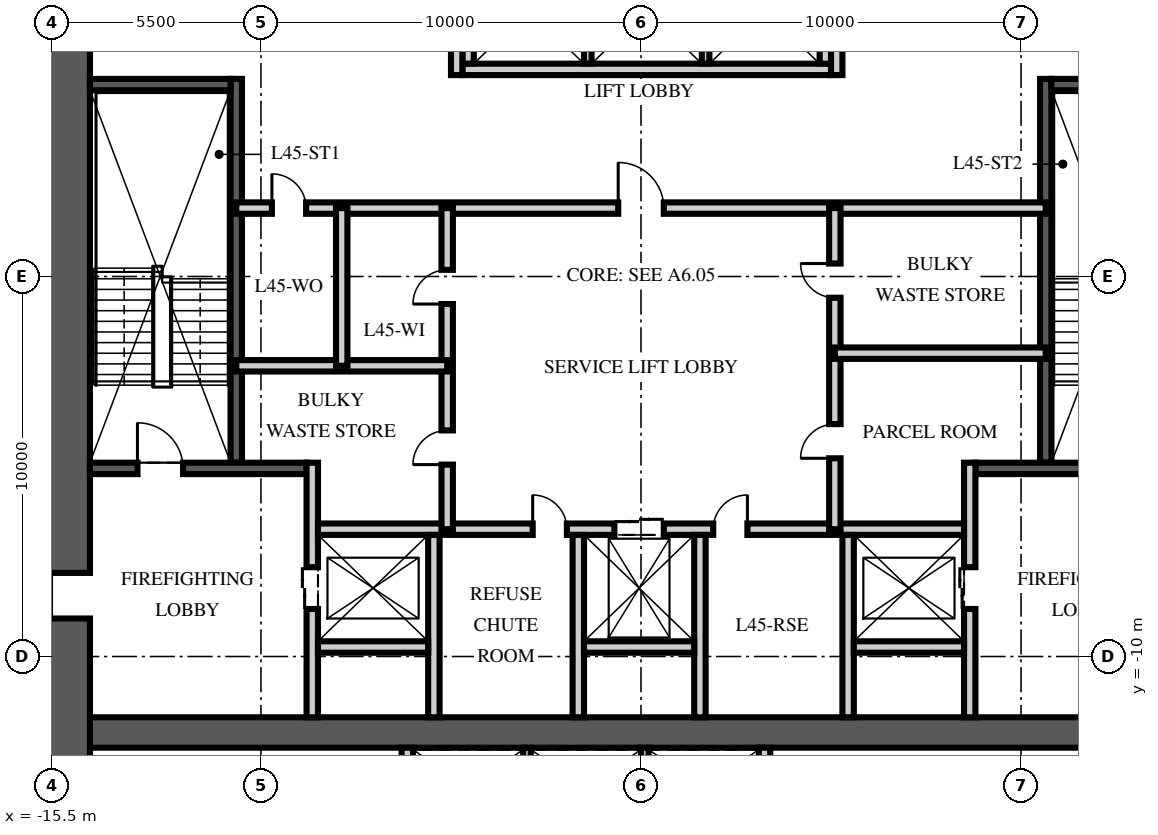
"""IFC4 building model, lengths in metres.
Left out: names, types, materials, properties, quantities, classifications, styles, units other than length and angle.
Written with IfcOpenShell. Run it as: python <this file> out.ifc"""

import sys

from ifc_helpers import new_model, si_unit, direction, frame, frame_2d, origin, place, context, subcontext, project, spatial, rectangle, extrude, element, fill, save


model = new_model("IFC4")
c1 = context("Model", 3, precision=1e-05, world=origin(), true_north=direction((0.0, 1.0)))
c2 = subcontext(c1, "Body", "Model", "MODEL_VIEW")
j1 = project(units=[si_unit("LENGTHUNIT", "METRE"), si_unit("PLANEANGLEUNIT", "RADIAN")], contexts=[c1])
p1 = place(None, origin())
s1 = spatial("IfcSite", under=j1, at=p1, CompositionType="ELEMENT")
p2 = place(p1, origin())
s2 = spatial("IfcBuilding", under=s1, at=p2, CompositionType="ELEMENT")
p3 = place(p2, frame((0.0, 0.0, 178.5)))
s3 = spatial("IfcBuildingStorey", under=s2, at=p3, CompositionType="ELEMENT", Elevation=178.5)
p4 = place(p3, frame((-15.5, -12.0, -0.25), z_axis=(0.0, 0.0, 1.0), x_axis=(1.0, 0.0, 0.0)))
e1 = element("IfcWall", 1, at=p4, inside=s3, PredefinedType="SHEAR", context=c2, shape_type="SweptSolid", body=[
    extrude(rectangle(XDim=31.0, YDim=0.8, at=frame_2d((15.5, 0.0))), origin(), (0.0, 0.0, 1.0), 3.75),
])
p5 = place(p3, frame((-15.5, -15.5, -0.25), z_axis=(0.0, 0.0, 1.0), x_axis=(0.0, 1.0, 0.0)))
e2 = element("IfcWall", 2, at=p5, inside=s3, PredefinedType="SHEAR", context=c2, shape_type="SweptSolid", body=[
    extrude(rectangle(XDim=31.0, YDim=2.0, at=frame_2d((15.5, 0.0))), origin(), (0.0, 0.0, 1.0), 3.75),
])
p6 = place(p5, frame((6.5, 0.0, 0.25)))
e3 = element("IfcOpeningElement", 3, at=p6, cuts=e2, PredefinedType="OPENING", context=c2, shape_type="SweptSolid", body=[
    extrude(rectangle(XDim=1.2, YDim=2.1, at=frame_2d((0.6, 1.05))), frame((0.0, 1.01, 0.0), z_axis=(0.0, -1.0, 0.0), x_axis=(1.0, 0.0, 0.0)), (0.0, 0.0, 1.0), 2.02),
])
p7 = place(p5, frame((23.0, 0.0, 0.25)))
e4 = element("IfcOpeningElement", 4, at=p7, cuts=e2, PredefinedType="OPENING", context=c2, shape_type="SweptSolid", body=[
    extrude(rectangle(XDim=1.8, YDim=2.1, at=frame_2d((0.9, 1.05))), frame((0.0, 1.01, 0.0), z_axis=(0.0, -1.0, 0.0), x_axis=(1.0, 0.0, 0.0)), (0.0, 0.0, 1.0), 2.02),
])
p8 = place(p3, frame((-10.65, -4.9, 0.0), z_axis=(0.0, 0.0, 1.0), x_axis=(0.0, 1.0, 0.0)))
e5 = element("IfcWall", 5, at=p8, inside=s3, PredefinedType="SOLIDWALL", context=c2, shape_type="SweptSolid", body=[
    extrude(rectangle(XDim=10.1, YDim=0.3, at=frame_2d((5.05, 0.0))), origin(), (0.0, 0.0, 1.0), 3.5),
])
p9 = place(p3, frame((-14.5, -5.05, 0.0), z_axis=(0.0, 0.0, 1.0), x_axis=(1.0, 0.0, 0.0)))
e6 = element("IfcWall", 6, at=p9, inside=s3, PredefinedType="SOLIDWALL", context=c2, shape_type="SweptSolid", body=[
    extrude(rectangle(XDim=5.7, YDim=0.3, at=frame_2d((2.85, 0.0))), origin(), (0.0, 0.0, 1.0), 3.5),
])
p10 = place(p9, frame((1.25, 0.0, 0.0)))
e7 = element("IfcOpeningElement", 7, at=p10, cuts=e6, PredefinedType="OPENING", context=c2, shape_type="SweptSolid", body=[
    extrude(rectangle(XDim=1.2, YDim=2.1, at=frame_2d((0.6, 1.05))), frame((0.0, 0.16, 0.0), z_axis=(0.0, -1.0, 0.0), x_axis=(1.0, 0.0, 0.0)), (0.0, 0.0, 1.0), 0.32),
])
p11 = place(p3, frame((-14.5, 5.05, 0.0), z_axis=(0.0, 0.0, 1.0), x_axis=(1.0, 0.0, 0.0)))
e8 = element("IfcWall", 8, at=p11, inside=s3, PredefinedType="SOLIDWALL", context=c2, shape_type="SweptSolid", body=[
    extrude(rectangle(XDim=3.7, YDim=0.3, at=frame_2d((1.85, 0.0))), origin(), (0.0, 0.0, 1.0), 3.5),
])
p12 = place(p3, frame((-8.65, -11.6, 0.0), z_axis=(0.0, 0.0, 1.0), x_axis=(0.0, 1.0, 0.0)))
e9 = element("IfcWall", 9, at=p12, inside=s3, PredefinedType="PARTITIONING", context=c2, shape_type="SweptSolid", body=[
    extrude(rectangle(XDim=6.7, YDim=0.3, at=frame_2d((3.35, 0.0))), origin(), (0.0, 0.0, 1.0), 3.5),
])
p13 = place(p12, frame((2.85, 0.0, 0.0)))
e10 = element("IfcOpeningElement", 10, at=p13, cuts=e9, PredefinedType="OPENING", context=c2, shape_type="SweptSolid", body=[
    extrude(rectangle(XDim=1.1, YDim=2.1, at=frame_2d((0.55, 1.05))), frame((0.0, 0.16, 0.0), z_axis=(0.0, -1.0, 0.0), x_axis=(1.0, 0.0, 0.0)), (0.0, 0.0, 1.0), 0.32),
])
p14 = place(p3, frame((10.65, -4.9, 0.0), z_axis=(0.0, 0.0, 1.0), x_axis=(0.0, 1.0, 0.0)))
e11 = element("IfcWall", 11, at=p14, inside=s3, PredefinedType="SOLIDWALL", context=c2, shape_type="SweptSolid", body=[
    extrude(rectangle(XDim=10.1, YDim=0.3, at=frame_2d((5.05, 0.0))), origin(), (0.0, 0.0, 1.0), 3.5),
])
p15 = place(p3, frame((14.5, -5.05, 0.0), z_axis=(0.0, 0.0, 1.0), x_axis=(-1.0, 0.0, 0.0)))
e12 = element("IfcWall", 12, at=p15, inside=s3, PredefinedType="SOLIDWALL", context=c2, shape_type="SweptSolid", body=[
    extrude(rectangle(XDim=5.7, YDim=0.3, at=frame_2d((2.85, 0.0))), origin(), (0.0, 0.0, 1.0), 3.5),
])
p16 = place(p15, frame((1.25, 0.0, 0.0)))
e13 = element("IfcOpeningElement", 13, at=p16, cuts=e12, PredefinedType="OPENING", context=c2, shape_type="SweptSolid", body=[
    extrude(rectangle(XDim=1.2, YDim=2.1, at=frame_2d((0.6, 1.05))), frame((0.0, 0.16, 0.0), z_axis=(0.0, -1.0, 0.0), x_axis=(1.0, 0.0, 0.0)), (0.0, 0.0, 1.0), 0.32),
])
p17 = place(p3, frame((14.5, 5.05, 0.0), z_axis=(0.0, 0.0, 1.0), x_axis=(-1.0, 0.0, 0.0)))
e14 = element("IfcWall", 14, at=p17, inside=s3, PredefinedType="SOLIDWALL", context=c2, shape_type="SweptSolid", body=[
    extrude(rectangle(XDim=3.7, YDim=0.3, at=frame_2d((1.85, 0.0))), origin(), (0.0, 0.0, 1.0), 3.5),
])
p18 = place(p3, frame((8.65, -11.6, 0.0), z_axis=(0.0, 0.0, 1.0), x_axis=(0.0, 1.0, 0.0)))
e15 = element("IfcWall", 15, at=p18, inside=s3, PredefinedType="PARTITIONING", context=c2, shape_type="SweptSolid", body=[
    extrude(rectangle(XDim=6.7, YDim=0.3, at=frame_2d((3.35, 0.0))), origin(), (0.0, 0.0, 1.0), 3.5),
])
p19 = place(p18, frame((2.85, 0.0, 0.0)))
e16 = element("IfcOpeningElement", 16, at=p19, cuts=e15, PredefinedType="OPENING", context=c2, shape_type="SweptSolid", body=[
    extrude(rectangle(XDim=1.1, YDim=2.1, at=frame_2d((0.55, 1.05))), frame((0.0, 0.16, 0.0), z_axis=(0.0, -1.0, 0.0), x_axis=(1.0, 0.0, 0.0)), (0.0, 0.0, 1.0), 0.32),
])
p20 = place(p3, frame((-8.5, -6.65, 0.0), z_axis=(0.0, 0.0, 1.0), x_axis=(1.0, 0.0, 0.0)))
e17 = element("IfcWall", 17, at=p20, inside=s3, PredefinedType="PARTITIONING", context=c2, shape_type="SweptSolid", body=[
    extrude(rectangle(XDim=17.0, YDim=0.3, at=frame_2d((8.5, 0.0))), origin(), (0.0, 0.0, 1.0), 3.5),
])
p21 = place(p20, frame((7.8, 0.0, 0.0)))
e18 = element("IfcOpeningElement", 18, at=p21, cuts=e17, PredefinedType="OPENING", context=c2, shape_type="SweptSolid", body=[
    extrude(rectangle(XDim=1.3, YDim=2.4, at=frame_2d((0.65, 1.2))), frame((0.0, 0.16, 0.0), z_axis=(0.0, -1.0, 0.0), x_axis=(1.0, 0.0, 0.0)), (0.0, 0.0, 1.0), 0.32),
])
p22 = place(p20, frame((5.65, 0.0, 0.0)))
e19 = element("IfcOpeningElement", 19, at=p22, cuts=e17, PredefinedType="OPENING", context=c2, shape_type="SweptSolid", body=[
    extrude(rectangle(XDim=0.9, YDim=2.1, at=frame_2d((0.45, 1.05))), frame((0.0, 0.16, 0.0), z_axis=(0.0, -1.0, 0.0), x_axis=(1.0, 0.0, 0.0)), (0.0, 0.0, 1.0), 0.32),
])
p23 = place(p20, frame((10.4, 0.0, 0.0)))
e20 = element("IfcOpeningElement", 20, at=p23, cuts=e17, PredefinedType="OPENING", context=c2, shape_type="SweptSolid", body=[
    extrude(rectangle(XDim=0.9, YDim=2.1, at=frame_2d((0.45, 1.05))), frame((0.0, 0.16, 0.0), z_axis=(0.0, -1.0, 0.0), x_axis=(1.0, 0.0, 0.0)), (0.0, 0.0, 1.0), 0.32),
])
for number, where, z_axis, x_axis in (
    (21, (-5.45, -11.6, 0.0), (0.0, 0.0, 1.0), (0.0, 1.0, 0.0)),
    (22, (-1.65, -11.6, 0.0), (0.0, 0.0, 1.0), (0.0, 1.0, 0.0)),
    (23, (1.55, -11.6, 0.0), (0.0, 0.0, 1.0), (0.0, 1.0, 0.0)),
    (24, (5.45, -11.6, 0.0), (0.0, 0.0, 1.0), (0.0, 1.0, 0.0)),
):
    element("IfcWall", number, at=place(p3, frame(where, z_axis=z_axis, x_axis=x_axis)), inside=s3, PredefinedType="PARTITIONING", context=c2, shape_type="SweptSolid", body=[
        extrude(rectangle(XDim=4.8, YDim=0.3, at=frame_2d((2.4, 0.0))), origin(), (0.0, 0.0, 1.0), 3.5),
    ])
for number, where, z_axis, x_axis in (
    (25, (-8.5, -9.75, 0.0), (0.0, 0.0, 1.0), (1.0, 0.0, 0.0)),
    (26, (-1.5, -9.75, 0.0), (0.0, 0.0, 1.0), (1.0, 0.0, 0.0)),
    (27, (5.6, -9.75, 0.0), (0.0, 0.0, 1.0), (1.0, 0.0, 0.0)),
):
    element("IfcWall", number, at=place(p3, frame(where, z_axis=z_axis, x_axis=x_axis)), inside=s3, PredefinedType="PARTITIONING", context=c2, shape_type="SweptSolid", body=[
        extrude(rectangle(XDim=2.9, YDim=0.3, at=frame_2d((1.45, 0.0))), origin(), (0.0, 0.0, 1.0), 3.5),
    ])
p24 = place(p3, frame((-4.7, 5.45, 0.0), z_axis=(0.0, 0.0, 1.0), x_axis=(1.0, 0.0, 0.0)))
e28 = element("IfcWall", 28, at=p24, inside=s3, PredefinedType="PARTITIONING", context=c2, shape_type="SweptSolid", body=[
    extrude(rectangle(XDim=9.7, YDim=0.3, at=frame_2d((4.85, 0.0))), origin(), (0.0, 0.0, 1.0), 3.5),
])
for number, where, z_axis, x_axis in (
    (29, (-4.55, 5.6, 0.0), (0.0, 0.0, 1.0), (0.0, 1.0, 0.0)),
    (30, (4.85, 5.6, 0.0), (0.0, 0.0, 1.0), (0.0, 1.0, 0.0)),
):
    element("IfcWall", number, at=place(p3, frame(where, z_axis=z_axis, x_axis=x_axis)), inside=s3, PredefinedType="PARTITIONING", context=c2, shape_type="SweptSolid", body=[
        extrude(rectangle(XDim=2.8, YDim=0.3, at=frame_2d((1.4, 0.0))), origin(), (0.0, 0.0, 1.0), 3.5),
    ])
for number, where, z_axis, x_axis in (
    (31, (-1.4, 5.6, 0.0), (0.0, 0.0, 1.0), (0.0, 1.0, 0.0)),
    (32, (1.7, 5.6, 0.0), (0.0, 0.0, 1.0), (0.0, 1.0, 0.0)),
):
    element("IfcWall", number, at=place(p3, frame(where, z_axis=z_axis, x_axis=x_axis)), inside=s3, PredefinedType="PARTITIONING", context=c2, shape_type="SweptSolid", body=[
        extrude(rectangle(XDim=2.8, YDim=0.2, at=frame_2d((1.4, 0.0))), origin(), (0.0, 0.0, 1.0), 3.5),
    ])
for number, where, z_axis, x_axis in (
    (33, (-6.15, -14.5, 0.0), (0.0, 0.0, 1.0), (0.0, 1.0, 0.0)),
    (34, (3.25, -14.5, 0.0), (0.0, 0.0, 1.0), (0.0, 1.0, 0.0)),
):
    element("IfcWall", number, at=place(p3, frame(where, z_axis=z_axis, x_axis=x_axis)), inside=s3, PredefinedType="PARTITIONING", context=c2, shape_type="SweptSolid", body=[
        extrude(rectangle(XDim=2.1, YDim=0.3, at=frame_2d((1.05, 0.0))), origin(), (0.0, 0.0, 1.0), 3.5),
    ])
for number, where, z_axis, x_axis in (
    (35, (-3.0, -14.5, 0.0), (0.0, 0.0, 1.0), (0.0, 1.0, 0.0)),
    (36, (0.1, -14.5, 0.0), (0.0, 0.0, 1.0), (0.0, 1.0, 0.0)),
):
    element("IfcWall", number, at=place(p3, frame(where, z_axis=z_axis, x_axis=x_axis)), inside=s3, PredefinedType="PARTITIONING", context=c2, shape_type="SweptSolid", body=[
        extrude(rectangle(XDim=2.1, YDim=0.2, at=frame_2d((1.05, 0.0))), origin(), (0.0, 0.0, 1.0), 3.5),
    ])
p25 = place(p3, frame((-10.65, 1.8, 0.0), z_axis=(0.0, 0.0, 1.0), x_axis=(1.0, 0.0, 0.0)))
e37 = element("IfcWall", 37, at=p25, inside=s3, PredefinedType="PARTITIONING", context=c2, shape_type="SweptSolid", body=[
    extrude(rectangle(XDim=21.3, YDim=0.3, at=frame_2d((10.65, 0.0))), origin(), (0.0, 0.0, 1.0), 3.5),
])
p26 = place(p25, frame((10.05, 0.0, 0.0)))
e38 = element("IfcOpeningElement", 38, at=p26, cuts=e37, PredefinedType="OPENING", context=c2, shape_type="SweptSolid", body=[
    extrude(rectangle(XDim=1.2, YDim=2.1, at=frame_2d((0.6, 1.05))), frame((0.0, 0.16, 0.0), z_axis=(0.0, -1.0, 0.0), x_axis=(1.0, 0.0, 0.0)), (0.0, 0.0, 1.0), 0.32),
])
p27 = place(p25, frame((0.938, 0.0, 0.0)))
e39 = element("IfcOpeningElement", 39, at=p27, cuts=e37, PredefinedType="OPENING", context=c2, shape_type="SweptSolid", body=[
    extrude(rectangle(XDim=0.9, YDim=2.1, at=frame_2d((0.45, 1.05))), frame((0.0, 0.16, 0.0), z_axis=(0.0, -1.0, 0.0), x_axis=(1.0, 0.0, 0.0)), (0.0, 0.0, 1.0), 0.32),
])
p28 = place(p3, frame((-5.1, -6.65, 0.0), z_axis=(0.0, 0.0, 1.0), x_axis=(0.0, 1.0, 0.0)))
e40 = element("IfcWall", 40, at=p28, inside=s3, PredefinedType="PARTITIONING", context=c2, shape_type="SweptSolid", body=[
    extrude(rectangle(XDim=8.45, YDim=0.3, at=frame_2d((4.225, 0.0))), origin(), (0.0, 0.0, 1.0), 3.5),
])
p29 = place(p28, frame((1.7, 0.0, 0.0)))
e41 = element("IfcOpeningElement", 41, at=p29, cuts=e40, PredefinedType="OPENING", context=c2, shape_type="SweptSolid", body=[
    extrude(rectangle(XDim=0.9, YDim=2.1, at=frame_2d((0.45, 1.05))), frame((0.0, 0.16, 0.0), z_axis=(0.0, -1.0, 0.0), x_axis=(1.0, 0.0, 0.0)), (0.0, 0.0, 1.0), 0.32),
])
p30 = place(p28, frame((5.925, 0.0, 0.0)))
e42 = element("IfcOpeningElement", 42, at=p30, cuts=e40, PredefinedType="OPENING", context=c2, shape_type="SweptSolid", body=[
    extrude(rectangle(XDim=0.9, YDim=2.1, at=frame_2d((0.45, 1.05))), frame((0.0, 0.16, 0.0), z_axis=(0.0, -1.0, 0.0), x_axis=(1.0, 0.0, 0.0)), (0.0, 0.0, 1.0), 0.32),
])
p31 = place(p3, frame((5.1, -6.65, 0.0), z_axis=(0.0, 0.0, 1.0), x_axis=(0.0, 1.0, 0.0)))
e43 = element("IfcWall", 43, at=p31, inside=s3, PredefinedType="PARTITIONING", context=c2, shape_type="SweptSolid", body=[
    extrude(rectangle(XDim=8.45, YDim=0.3, at=frame_2d((4.225, 0.0))), origin(), (0.0, 0.0, 1.0), 3.5),
])
p32 = place(p31, frame((1.866, 0.0, 0.0)))
e44 = element("IfcOpeningElement", 44, at=p32, cuts=e43, PredefinedType="OPENING", context=c2, shape_type="SweptSolid", body=[
    extrude(rectangle(XDim=0.9, YDim=2.1, at=frame_2d((0.45, 1.05))), frame((0.0, 0.16, 0.0), z_axis=(0.0, -1.0, 0.0), x_axis=(1.0, 0.0, 0.0)), (0.0, 0.0, 1.0), 0.32),
])
p33 = place(p31, frame((6.091, 0.0, 0.0)))
e45 = element("IfcOpeningElement", 45, at=p33, cuts=e43, PredefinedType="OPENING", context=c2, shape_type="SweptSolid", body=[
    extrude(rectangle(XDim=0.9, YDim=2.1, at=frame_2d((0.45, 1.05))), frame((0.0, 0.16, 0.0), z_axis=(0.0, -1.0, 0.0), x_axis=(1.0, 0.0, 0.0)), (0.0, 0.0, 1.0), 0.32),
])
p34 = place(p3, frame((-10.65, -2.35, 0.0), z_axis=(0.0, 0.0, 1.0), x_axis=(1.0, 0.0, 0.0)))
e46 = element("IfcWall", 46, at=p34, inside=s3, PredefinedType="PARTITIONING", context=c2, shape_type="SweptSolid", body=[
    extrude(rectangle(XDim=5.55, YDim=0.3, at=frame_2d((2.775, 0.0))), origin(), (0.0, 0.0, 1.0), 3.5),
])
p35 = place(p3, frame((-7.875, -2.35, 0.0), z_axis=(0.0, 0.0, 1.0), x_axis=(0.0, 1.0, 0.0)))
e47 = element("IfcWall", 47, at=p35, inside=s3, PredefinedType="PARTITIONING", context=c2, shape_type="SweptSolid", body=[
    extrude(rectangle(XDim=4.15, YDim=0.3, at=frame_2d((2.075, 0.0))), origin(), (0.0, 0.0, 1.0), 3.5),
])
p36 = place(p3, frame((10.65, -2.018, 0.0), z_axis=(0.0, 0.0, 1.0), x_axis=(-1.0, 0.0, 0.0)))
e48 = element("IfcWall", 48, at=p36, inside=s3, PredefinedType="PARTITIONING", context=c2, shape_type="SweptSolid", body=[
    extrude(rectangle(XDim=5.55, YDim=0.3, at=frame_2d((2.775, 0.0))), origin(), (0.0, 0.0, 1.0), 3.5),
])
p37 = place(p3, frame((-4.85, 5.3, 0.0), z_axis=(0.0, 0.0, 1.0), x_axis=(0.0, 1.0, 0.0)))
e49 = element("IfcWall", 49, at=p37, inside=s3, PredefinedType="PARTITIONING", context=c2, shape_type="SweptSolid", body=[
    extrude(rectangle(XDim=6.3, YDim=0.3, at=frame_2d((3.15, 0.0))), origin(), (0.0, 0.0, 1.0), 3.5),
])
p38 = place(p3, frame((5.15, 5.3, 0.0), z_axis=(0.0, 0.0, 1.0), x_axis=(0.0, 1.0, 0.0)))
e50 = element("IfcWall", 50, at=p38, inside=s3, PredefinedType="PARTITIONING", context=c2, shape_type="SweptSolid", body=[
    extrude(rectangle(XDim=6.3, YDim=0.3, at=frame_2d((3.15, 0.0))), origin(), (0.0, 0.0, 1.0), 3.5),
])
p39 = place(p38, frame((4.35, 0.0, 0.0)))
e51 = element("IfcOpeningElement", 51, at=p39, cuts=e50, PredefinedType="OPENING", context=c2, shape_type="SweptSolid", body=[
    extrude(rectangle(XDim=0.9, YDim=2.1, at=frame_2d((0.45, 1.05))), frame((0.0, 0.16, 0.0), z_axis=(0.0, -1.0, 0.0), x_axis=(1.0, 0.0, 0.0)), (0.0, 0.0, 1.0), 0.32),
])
p40 = place(p10, origin())
e52 = element("IfcDoor", 52, at=p40, inside=s3, OperationType="SINGLE_SWING_LEFT", PredefinedType="DOOR", context=c2, shape_type="SweptSolid", body=[
    extrude(rectangle(XDim=1.2, YDim=2.1, at=frame_2d((0.6, 1.05))), frame((0.0, 0.025, 0.0), z_axis=(0.0, -1.0, 0.0), x_axis=(1.0, 0.0, 0.0)), (0.0, 0.0, 1.0), 0.05),
])
fill(e7, e52)
p41 = place(p6, origin())
e53 = element("IfcDoor", 53, at=p41, inside=s3, OperationType="SINGLE_SWING_LEFT", PredefinedType="DOOR", context=c2, shape_type="SweptSolid", body=[
    extrude(rectangle(XDim=1.2, YDim=2.1, at=frame_2d((0.6, 1.05))), frame((0.0, 0.025, 0.0), z_axis=(0.0, -1.0, 0.0), x_axis=(1.0, 0.0, 0.0)), (0.0, 0.0, 1.0), 0.05),
])
fill(e3, e53)
p42 = place(p13, origin())
e54 = element("IfcDoor", 54, at=p42, inside=s3, OperationType="DOUBLE_DOOR_SLIDING", PredefinedType="DOOR", context=c2, shape_type="SweptSolid", body=[
    extrude(rectangle(XDim=1.1, YDim=2.1, at=frame_2d((0.55, 1.05))), frame((0.0, 0.025, 0.0), z_axis=(0.0, -1.0, 0.0), x_axis=(1.0, 0.0, 0.0)), (0.0, 0.0, 1.0), 0.05),
])
fill(e10, e54)
p43 = place(p19, origin())
e55 = element("IfcDoor", 55, at=p43, inside=s3, OperationType="DOUBLE_DOOR_SLIDING", PredefinedType="DOOR", context=c2, shape_type="SweptSolid", body=[
    extrude(rectangle(XDim=1.1, YDim=2.1, at=frame_2d((0.55, 1.05))), frame((0.0, 0.025, 0.0), z_axis=(0.0, -1.0, 0.0), x_axis=(1.0, 0.0, 0.0)), (0.0, 0.0, 1.0), 0.05),
])
fill(e16, e55)
p44 = place(p21, origin())
e56 = element("IfcDoor", 56, at=p44, inside=s3, OperationType="DOUBLE_DOOR_SLIDING", PredefinedType="DOOR", context=c2, shape_type="SweptSolid", body=[
    extrude(rectangle(XDim=1.3, YDim=2.4, at=frame_2d((0.65, 1.2))), frame((0.0, 0.025, 0.0), z_axis=(0.0, -1.0, 0.0), x_axis=(1.0, 0.0, 0.0)), (0.0, 0.0, 1.0), 0.05),
])
fill(e18, e56)
p45 = place(p26, origin())
e57 = element("IfcDoor", 57, at=p45, inside=s3, OperationType="SINGLE_SWING_LEFT", PredefinedType="DOOR", context=c2, shape_type="SweptSolid", body=[
    extrude(rectangle(XDim=1.2, YDim=2.1, at=frame_2d((0.6, 1.05))), frame((0.0, 0.025, 0.0), z_axis=(0.0, -1.0, 0.0), x_axis=(1.0, 0.0, 0.0)), (0.0, 0.0, 1.0), 0.05),
])
fill(e38, e57)
p46 = place(p22, origin())
e58 = element("IfcDoor", 58, at=p46, inside=s3, OperationType="SINGLE_SWING_LEFT", PredefinedType="DOOR", context=c2, shape_type="SweptSolid", body=[
    extrude(rectangle(XDim=0.9, YDim=2.1, at=frame_2d((0.45, 1.05))), frame((0.0, 0.025, 0.0), z_axis=(0.0, -1.0, 0.0), x_axis=(1.0, 0.0, 0.0)), (0.0, 0.0, 1.0), 0.05),
])
fill(e19, e58)
p47 = place(p23, origin())
e59 = element("IfcDoor", 59, at=p47, inside=s3, OperationType="SINGLE_SWING_RIGHT", PredefinedType="DOOR", context=c2, shape_type="SweptSolid", body=[
    extrude(rectangle(XDim=0.9, YDim=2.1, at=frame_2d((0.45, 1.05))), frame((0.0, 0.025, 0.0), z_axis=(0.0, -1.0, 0.0), x_axis=(1.0, 0.0, 0.0)), (0.0, 0.0, 1.0), 0.05),
])
fill(e20, e59)
p48 = place(p29, origin())
e60 = element("IfcDoor", 60, at=p48, inside=s3, OperationType="SINGLE_SWING_LEFT", PredefinedType="DOOR", context=c2, shape_type="SweptSolid", body=[
    extrude(rectangle(XDim=0.9, YDim=2.1, at=frame_2d((0.45, 1.05))), frame((0.0, 0.025, 0.0), z_axis=(0.0, -1.0, 0.0), x_axis=(1.0, 0.0, 0.0)), (0.0, 0.0, 1.0), 0.05),
])
fill(e41, e60)
p49 = place(p30, origin())
e61 = element("IfcDoor", 61, at=p49, inside=s3, OperationType="SINGLE_SWING_LEFT", PredefinedType="DOOR", context=c2, shape_type="SweptSolid", body=[
    extrude(rectangle(XDim=0.9, YDim=2.1, at=frame_2d((0.45, 1.05))), frame((0.0, 0.025, 0.0), z_axis=(0.0, -1.0, 0.0), x_axis=(1.0, 0.0, 0.0)), (0.0, 0.0, 1.0), 0.05),
])
fill(e42, e61)
p50 = place(p27, origin())
e62 = element("IfcDoor", 62, at=p50, inside=s3, OperationType="SINGLE_SWING_LEFT", PredefinedType="DOOR", context=c2, shape_type="SweptSolid", body=[
    extrude(rectangle(XDim=0.9, YDim=2.1, at=frame_2d((0.45, 1.05))), frame((0.0, 0.025, 0.0), z_axis=(0.0, -1.0, 0.0), x_axis=(1.0, 0.0, 0.0)), (0.0, 0.0, 1.0), 0.05),
])
fill(e39, e62)
p51 = place(p32, origin())
e63 = element("IfcDoor", 63, at=p51, inside=s3, OperationType="SINGLE_SWING_LEFT", PredefinedType="DOOR", context=c2, shape_type="SweptSolid", body=[
    extrude(rectangle(XDim=0.9, YDim=2.1, at=frame_2d((0.45, 1.05))), frame((0.0, 0.025, 0.0), z_axis=(0.0, -1.0, 0.0), x_axis=(1.0, 0.0, 0.0)), (0.0, 0.0, 1.0), 0.05),
])
fill(e44, e63)
p52 = place(p33, origin())
e64 = element("IfcDoor", 64, at=p52, inside=s3, OperationType="SINGLE_SWING_RIGHT", PredefinedType="DOOR", context=c2, shape_type="SweptSolid", body=[
    extrude(rectangle(XDim=0.9, YDim=2.1, at=frame_2d((0.45, 1.05))), frame((0.0, 0.025, 0.0), z_axis=(0.0, -1.0, 0.0), x_axis=(1.0, 0.0, 0.0)), (0.0, 0.0, 1.0), 0.05),
])
fill(e45, e64)
save(model, sys.argv[1])
